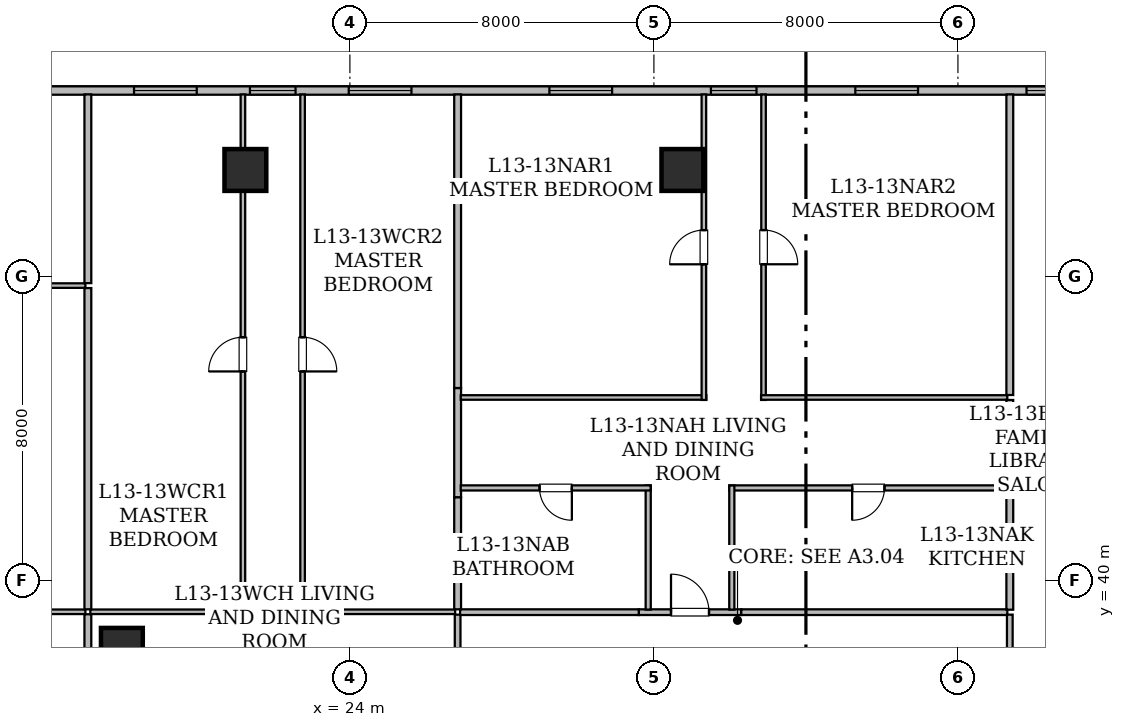
"""IFC4 building model, lengths in metres.
Left out: names, types, materials, properties, quantities, classifications, styles, units other than length and angle.
Written with IfcOpenShell. Run it as: python <this file> out.ifc"""

import sys

from ifc_helpers import new_model, si_unit, direction, frame, frame_2d, origin, origin_2d, place, context, subcontext, project, spatial, rectangle, hollow_rectangle, extrude, element, fill, save


model = new_model("IFC4")
c1 = context("Model", 3, precision=1e-05, world=origin(), true_north=direction((0.0, 1.0)))
c2 = subcontext(c1, "Body", "Model", "MODEL_VIEW")
j1 = project(units=[si_unit("LENGTHUNIT", "METRE"), si_unit("PLANEANGLEUNIT", "RADIAN")], contexts=[c1])
p1 = place(None, origin())
s1 = spatial("IfcSite", under=j1, at=p1, CompositionType="ELEMENT")
p2 = place(p1, origin())
s2 = spatial("IfcBuilding", under=s1, at=p2, CompositionType="ELEMENT")
p3 = place(p2, frame((0.0, 0.0, 55.2)))
s3 = spatial("IfcBuildingStorey", under=s2, at=p3, CompositionType="ELEMENT", Elevation=55.2)
for number, where, z_axis, x_axis in (
    (1, (21.25, 50.8, 0.0), (0.0, 0.0, 1.0), (1.0, 0.0, 0.0)),
    (2, (32.75, 50.8, 0.0), (0.0, 0.0, 1.0), (1.0, 0.0, 0.0)),
    (3, (18.0, 38.2, 0.0), (0.0, 0.0, 1.0), (1.0, 0.0, 0.0)),
):
    element("IfcColumn", number, at=place(p3, frame(where, z_axis=z_axis, x_axis=x_axis)), inside=s3, PredefinedType="COLUMN", context=c2, shape_type="SweptSolid", body=[
        extrude(hollow_rectangle(XDim=1.1, YDim=1.1, WallThickness=0.055, at=origin_2d()), origin(), (0.0, 0.0, 1.0), 3.65),
    ])
p4 = place(p3, frame((8.315, 52.89, 0.0), z_axis=(0.0, 0.0, 1.0), x_axis=(1.0, 0.0, 0.0)))
e4 = element("IfcWall", 4, at=p4, inside=s3, PredefinedType="STANDARD", context=c2, shape_type="SweptSolid", body=[
    extrude(rectangle(XDim=37.439, YDim=0.22, at=frame_2d((18.719, 0.0))), origin(), (0.0, 0.0, 1.0), 3.43),
])
p5 = place(p4, frame((5.093, 0.0, 0.85)))
e5 = element("IfcOpeningElement", 5, at=p5, cuts=e4, PredefinedType="OPENING", context=c2, shape_type="SweptSolid", body=[
    extrude(rectangle(XDim=1.65, YDim=1.55, at=frame_2d((0.825, 0.775))), frame((0.0, 0.12, 0.0), z_axis=(0.0, -1.0, 0.0), x_axis=(1.0, 0.0, 0.0)), (0.0, 0.0, 1.0), 0.24),
])
p6 = place(p4, frame((13.055, 0.0, 0.8)))
e6 = element("IfcOpeningElement", 6, at=p6, cuts=e4, PredefinedType="OPENING", context=c2, shape_type="SweptSolid", body=[
    extrude(rectangle(XDim=1.2, YDim=1.5, at=frame_2d((0.6, 0.75))), frame((0.0, 0.12, 0.0), z_axis=(0.0, -1.0, 0.0), x_axis=(1.0, 0.0, 0.0)), (0.0, 0.0, 1.0), 0.24),
])
p7 = place(p4, frame((10.005, 0.0, 0.85)))
e7 = element("IfcOpeningElement", 7, at=p7, cuts=e4, PredefinedType="OPENING", context=c2, shape_type="SweptSolid", body=[
    extrude(rectangle(XDim=1.65, YDim=1.55, at=frame_2d((0.825, 0.775))), frame((0.0, 0.12, 0.0), z_axis=(0.0, -1.0, 0.0), x_axis=(1.0, 0.0, 0.0)), (0.0, 0.0, 1.0), 0.24),
])
p8 = place(p4, frame((15.655, 0.0, 0.85)))
e8 = element("IfcOpeningElement", 8, at=p8, cuts=e4, PredefinedType="OPENING", context=c2, shape_type="SweptSolid", body=[
    extrude(rectangle(XDim=1.65, YDim=1.55, at=frame_2d((0.825, 0.775))), frame((0.0, 0.12, 0.0), z_axis=(0.0, -1.0, 0.0), x_axis=(1.0, 0.0, 0.0)), (0.0, 0.0, 1.0), 0.24),
])
p9 = place(p4, frame((25.185, 0.0, 0.8)))
e9 = element("IfcOpeningElement", 9, at=p9, cuts=e4, PredefinedType="OPENING", context=c2, shape_type="SweptSolid", body=[
    extrude(rectangle(XDim=1.2, YDim=1.5, at=frame_2d((0.6, 0.75))), frame((0.0, 0.12, 0.0), z_axis=(0.0, -1.0, 0.0), x_axis=(1.0, 0.0, 0.0)), (0.0, 0.0, 1.0), 0.24),
])
p10 = place(p4, frame((20.935, 0.0, 0.85)))
e10 = element("IfcOpeningElement", 10, at=p10, cuts=e4, PredefinedType="OPENING", context=c2, shape_type="SweptSolid", body=[
    extrude(rectangle(XDim=1.65, YDim=1.55, at=frame_2d((0.825, 0.775))), frame((0.0, 0.12, 0.0), z_axis=(0.0, -1.0, 0.0), x_axis=(1.0, 0.0, 0.0)), (0.0, 0.0, 1.0), 0.24),
])
p11 = place(p4, frame((28.985, 0.0, 0.85)))
e11 = element("IfcOpeningElement", 11, at=p11, cuts=e4, PredefinedType="OPENING", context=c2, shape_type="SweptSolid", body=[
    extrude(rectangle(XDim=1.65, YDim=1.55, at=frame_2d((0.825, 0.775))), frame((0.0, 0.12, 0.0), z_axis=(0.0, -1.0, 0.0), x_axis=(1.0, 0.0, 0.0)), (0.0, 0.0, 1.0), 0.24),
])
p12 = place(p4, frame((33.49, 0.0, 0.85)))
e12 = element("IfcOpeningElement", 12, at=p12, cuts=e4, PredefinedType="OPENING", context=c2, shape_type="SweptSolid", body=[
    extrude(rectangle(XDim=1.65, YDim=1.55, at=frame_2d((0.825, 0.775))), frame((0.0, 0.12, 0.0), z_axis=(0.0, -1.0, 0.0), x_axis=(1.0, 0.0, 0.0)), (0.0, 0.0, 1.0), 0.24),
])
p13 = place(p4, frame((35.942, 0.0, 0.85)))
e13 = element("IfcOpeningElement", 13, at=p13, cuts=e4, PredefinedType="OPENING", context=c2, shape_type="SweptSolid", body=[
    extrude(rectangle(XDim=1.35, YDim=1.5, at=frame_2d((0.675, 0.75))), frame((0.0, 0.12, 0.0), z_axis=(0.0, -1.0, 0.0), x_axis=(1.0, 0.0, 0.0)), (0.0, 0.0, 1.0), 0.24),
])
p14 = place(p3, frame((26.835, 36.546, 0.0), z_axis=(0.0, 0.0, 1.0), x_axis=(0.0, 1.0, 0.0)))
e14 = element("IfcWall", 14, at=p14, inside=s3, PredefinedType="STANDARD", context=c2, shape_type="SweptSolid", body=[
    extrude(rectangle(XDim=2.554, YDim=0.15, at=frame_2d((1.277, 0.0))), origin(), (0.0, 0.0, 1.0), 2.647),
])
p15 = place(p3, frame((31.601, 39.165, 0.0), z_axis=(0.0, 0.0, 1.0), x_axis=(1.0, 0.0, 0.0)))
e15 = element("IfcWall", 15, at=p15, inside=s3, PredefinedType="STANDARD", context=c2, shape_type="SweptSolid", body=[
    extrude(rectangle(XDim=2.698, YDim=0.15, at=frame_2d((1.349, 0.0))), origin(), (0.0, 0.0, 1.0), 3.43),
])
p16 = place(p15, frame((0.849, 0.0, 0.0)))
e16 = element("IfcOpeningElement", 16, at=p16, cuts=e15, PredefinedType="OPENING", context=c2, shape_type="SweptSolid", body=[
    extrude(rectangle(XDim=1.0, YDim=2.15, at=frame_2d((0.5, 1.075))), frame((0.0, 0.085, 0.0), z_axis=(0.0, -1.0, 0.0), x_axis=(1.0, 0.0, 0.0)), (0.0, 0.0, 1.0), 0.17),
])
p17 = place(p3, frame((26.9, 39.165, 0.0), z_axis=(0.0, 0.0, 1.0), x_axis=(1.0, 0.0, 0.0)))
e17 = element("IfcWall", 17, at=p17, inside=s3, PredefinedType="STANDARD", context=c2, shape_type="SweptSolid", body=[
    extrude(rectangle(XDim=4.701, YDim=0.15, at=frame_2d((2.351, 0.0))), origin(), (0.0, 0.0, 1.0), 2.647),
])
p18 = place(p3, frame((34.299, 39.165, 0.0), z_axis=(0.0, 0.0, 1.0), x_axis=(1.0, 0.0, 0.0)))
e18 = element("IfcWall", 18, at=p18, inside=s3, PredefinedType="STANDARD", context=c2, shape_type="SweptSolid", body=[
    extrude(rectangle(XDim=7.001, YDim=0.15, at=frame_2d((3.5, 0.0))), origin(), (0.0, 0.0, 1.0), 3.43),
])
p19 = place(p3, frame((41.365, 39.1, 0.0), z_axis=(0.0, 0.0, 1.0), x_axis=(0.0, -1.0, 0.0)))
e19 = element("IfcWall", 19, at=p19, inside=s3, PredefinedType="STANDARD", context=c2, shape_type="SweptSolid", body=[
    extrude(rectangle(XDim=2.843, YDim=0.15, at=frame_2d((1.421, 0.0))), origin(), (0.0, 0.0, 1.0), 2.647),
])
p20 = place(p3, frame((11.295, 39.175, 0.0), z_axis=(0.0, 0.0, 1.0), x_axis=(1.0, 0.0, 0.0)))
e20 = element("IfcWall", 20, at=p20, inside=s3, PredefinedType="PARTITIONING", context=c2, shape_type="SweptSolid", body=[
    extrude(rectangle(XDim=5.745, YDim=0.12, at=frame_2d((2.873, 0.0))), origin(), (0.0, 0.0, 1.0), 3.43),
])
p21 = place(p3, frame((17.105, 39.11, 0.0), z_axis=(0.0, 0.0, 1.0), x_axis=(0.0, -1.0, 0.0)))
e21 = element("IfcWall", 21, at=p21, inside=s3, PredefinedType="STANDARD", context=c2, shape_type="SweptSolid", body=[
    extrude(rectangle(XDim=2.25, YDim=0.18, at=frame_2d((1.125, 0.0))), origin(), (0.0, 0.0, 1.0), 2.647),
])
p22 = place(p3, frame((11.414, 47.758, 0.0), z_axis=(0.0, 0.0, 1.0), x_axis=(1.0, 0.0, 0.0)))
e22 = element("IfcWall", 22, at=p22, inside=s3, PredefinedType="PARTITIONING", context=c2, shape_type="SweptSolid", body=[
    extrude(rectangle(XDim=5.626, YDim=0.12, at=frame_2d((2.813, 0.0))), origin(), (0.0, 0.0, 1.0), 2.647),
])
p23 = place(p3, frame((17.105, 47.693, 0.0), z_axis=(0.0, 0.0, 1.0), x_axis=(0.0, -1.0, 0.0)))
e23 = element("IfcWall", 23, at=p23, inside=s3, PredefinedType="STANDARD", context=c2, shape_type="SweptSolid", body=[
    extrude(rectangle(XDim=8.453, YDim=0.18, at=frame_2d((4.227, 0.0))), origin(), (0.0, 0.0, 1.0), 2.647),
])
p24 = place(p3, frame((17.105, 52.788, 0.0), z_axis=(0.0, 0.0, 1.0), x_axis=(0.0, -1.0, 0.0)))
e24 = element("IfcWall", 24, at=p24, inside=s3, PredefinedType="STANDARD", context=c2, shape_type="SweptSolid", body=[
    extrude(rectangle(XDim=4.965, YDim=0.18, at=frame_2d((2.482, 0.0))), origin(), (0.0, 0.0, 1.0), 2.803),
])
p25 = place(p3, frame((17.17, 39.175, 0.0), z_axis=(0.0, 0.0, 1.0), x_axis=(1.0, 0.0, 0.0)))
e25 = element("IfcWall", 25, at=p25, inside=s3, PredefinedType="PARTITIONING", context=c2, shape_type="SweptSolid", body=[
    extrude(rectangle(XDim=4.08, YDim=0.12, at=frame_2d((2.04, 0.0))), origin(), (0.0, 0.0, 1.0), 2.647),
])
p26 = place(p3, frame((21.185, 39.11, 0.0), z_axis=(0.0, 0.0, 1.0), x_axis=(0.0, 1.0, 0.0)))
e26 = element("IfcWall", 26, at=p26, inside=s3, PredefinedType="PARTITIONING", context=c2, shape_type="SweptSolid", body=[
    extrude(rectangle(XDim=13.678, YDim=0.12, at=frame_2d((6.839, 0.0))), origin(), (0.0, 0.0, 1.0), 2.647),
])
p27 = place(p26, frame((6.389, 0.0, 0.0)))
e27 = element("IfcOpeningElement", 27, at=p27, cuts=e26, PredefinedType="OPENING", context=c2, shape_type="SweptSolid", body=[
    extrude(rectangle(XDim=0.9, YDim=2.1, at=frame_2d((0.45, 1.05))), frame((0.0, 0.07, 0.0), z_axis=(0.0, -1.0, 0.0), x_axis=(1.0, 0.0, 0.0)), (0.0, 0.0, 1.0), 0.14),
])
p28 = place(p3, frame((22.755, 52.788, 0.0), z_axis=(0.0, 0.0, 1.0), x_axis=(0.0, -1.0, 0.0)))
e28 = element("IfcWall", 28, at=p28, inside=s3, PredefinedType="PARTITIONING", context=c2, shape_type="SweptSolid", body=[
    extrude(rectangle(XDim=13.678, YDim=0.12, at=frame_2d((6.839, 0.0))), origin(), (0.0, 0.0, 1.0), 2.803),
])
p29 = place(p28, frame((6.389, 0.0, 0.0)))
e29 = element("IfcOpeningElement", 29, at=p29, cuts=e28, PredefinedType="OPENING", context=c2, shape_type="SweptSolid", body=[
    extrude(rectangle(XDim=0.9, YDim=2.1, at=frame_2d((0.45, 1.05))), frame((0.0, 0.07, 0.0), z_axis=(0.0, -1.0, 0.0), x_axis=(1.0, 0.0, 0.0)), (0.0, 0.0, 1.0), 0.14),
])
p30 = place(p3, frame((22.69, 39.175, 0.0), z_axis=(0.0, 0.0, 1.0), x_axis=(1.0, 0.0, 0.0)))
e30 = element("IfcWall", 30, at=p30, inside=s3, PredefinedType="PARTITIONING", context=c2, shape_type="SweptSolid", body=[
    extrude(rectangle(XDim=4.08, YDim=0.12, at=frame_2d((2.04, 0.0))), origin(), (0.0, 0.0, 1.0), 3.43),
])
p31 = place(p3, frame((26.835, 45.063, 0.0), z_axis=(0.0, 0.0, 1.0), x_axis=(0.0, -1.0, 0.0)))
e31 = element("IfcWall", 31, at=p31, inside=s3, PredefinedType="STANDARD", context=c2, shape_type="SweptSolid", body=[
    extrude(rectangle(XDim=2.878, YDim=0.18, at=frame_2d((1.439, 0.0))), origin(), (0.0, 0.0, 1.0), 2.957),
])
p32 = place(p3, frame((26.835, 42.185, 0.0), z_axis=(0.0, 0.0, 1.0), x_axis=(0.0, -1.0, 0.0)))
e32 = element("IfcWall", 32, at=p32, inside=s3, PredefinedType="STANDARD", context=c2, shape_type="SweptSolid", body=[
    extrude(rectangle(XDim=2.945, YDim=0.18, at=frame_2d((1.473, 0.0))), origin(), (0.0, 0.0, 1.0), 3.43),
])
p33 = place(p3, frame((26.835, 52.788, 0.0), z_axis=(0.0, 0.0, 1.0), x_axis=(0.0, -1.0, 0.0)))
e33 = element("IfcWall", 33, at=p33, inside=s3, PredefinedType="STANDARD", context=c2, shape_type="SweptSolid", body=[
    extrude(rectangle(XDim=7.725, YDim=0.18, at=frame_2d((3.863, 0.0))), origin(), (0.0, 0.0, 1.0), 2.803),
])
p34 = place(p3, frame((31.85, 39.232, 0.0), z_axis=(0.0, 0.0, 1.0), x_axis=(0.0, 1.0, 0.0)))
e34 = element("IfcWall", 34, at=p34, inside=s3, PredefinedType="PARTITIONING", context=c2, shape_type="SweptSolid", body=[
    extrude(rectangle(XDim=3.267, YDim=0.135, at=frame_2d((1.634, 0.0))), origin(), (0.0, 0.0, 1.0), 3.43),
])
p35 = place(p3, frame((31.915, 42.434, 0.0), z_axis=(0.0, 0.0, 1.0), x_axis=(-1.0, 0.0, 0.0)))
e35 = element("IfcWall", 35, at=p35, inside=s3, PredefinedType="PARTITIONING", context=c2, shape_type="SweptSolid", body=[
    extrude(rectangle(XDim=4.998, YDim=0.135, at=frame_2d((2.499, 0.0))), origin(), (0.0, 0.0, 1.0), 2.647),
])
p36 = place(p35, frame((2.074, 0.0, 0.0)))
e36 = element("IfcOpeningElement", 36, at=p36, cuts=e35, PredefinedType="OPENING", context=c2, shape_type="SweptSolid", body=[
    extrude(rectangle(XDim=0.85, YDim=2.1, at=frame_2d((0.425, 1.05))), frame((0.0, 0.077, 0.0), z_axis=(0.0, -1.0, 0.0), x_axis=(1.0, 0.0, 0.0)), (0.0, 0.0, 1.0), 0.155),
])
p37 = place(p3, frame((41.3, 42.434, 0.0), z_axis=(0.0, 0.0, 1.0), x_axis=(-1.0, 0.0, 0.0)))
e37 = element("IfcWall", 37, at=p37, inside=s3, PredefinedType="PARTITIONING", context=c2, shape_type="SweptSolid", body=[
    extrude(rectangle(XDim=7.315, YDim=0.135, at=frame_2d((3.657, 0.0))), origin(), (0.0, 0.0, 1.0), 2.957),
])
p38 = place(p37, frame((3.233, 0.0, 0.0)))
e38 = element("IfcOpeningElement", 38, at=p38, cuts=e37, PredefinedType="OPENING", context=c2, shape_type="SweptSolid", body=[
    extrude(rectangle(XDim=0.85, YDim=2.1, at=frame_2d((0.425, 1.05))), frame((0.0, 0.077, 0.0), z_axis=(0.0, -1.0, 0.0), x_axis=(1.0, 0.0, 0.0)), (0.0, 0.0, 1.0), 0.155),
])
p39 = place(p3, frame((34.05, 42.499, 0.0), z_axis=(0.0, 0.0, 1.0), x_axis=(0.0, -1.0, 0.0)))
e39 = element("IfcWall", 39, at=p39, inside=s3, PredefinedType="PARTITIONING", context=c2, shape_type="SweptSolid", body=[
    extrude(rectangle(XDim=3.267, YDim=0.135, at=frame_2d((1.634, 0.0))), origin(), (0.0, 0.0, 1.0), 3.43),
])
p40 = place(p3, frame((26.917, 44.814, 0.0), z_axis=(0.0, 0.0, 1.0), x_axis=(1.0, 0.0, 0.0)))
e40 = element("IfcWall", 40, at=p40, inside=s3, PredefinedType="PARTITIONING", context=c2, shape_type="SweptSolid", body=[
    extrude(rectangle(XDim=6.463, YDim=0.12, at=frame_2d((3.231, 0.0))), origin(), (0.0, 0.0, 1.0), 2.647),
])
p41 = place(p3, frame((33.315, 44.749, 0.0), z_axis=(0.0, 0.0, 1.0), x_axis=(0.0, 1.0, 0.0)))
e41 = element("IfcWall", 41, at=p41, inside=s3, PredefinedType="PARTITIONING", context=c2, shape_type="SweptSolid", body=[
    extrude(rectangle(XDim=8.039, YDim=0.12, at=frame_2d((4.02, 0.0))), origin(), (0.0, 0.0, 1.0), 2.803),
])
p42 = place(p41, frame((3.569, 0.0, 0.0)))
e42 = element("IfcOpeningElement", 42, at=p42, cuts=e41, PredefinedType="OPENING", context=c2, shape_type="SweptSolid", body=[
    extrude(rectangle(XDim=0.9, YDim=2.1, at=frame_2d((0.45, 1.05))), frame((0.0, 0.07, 0.0), z_axis=(0.0, -1.0, 0.0), x_axis=(1.0, 0.0, 0.0)), (0.0, 0.0, 1.0), 0.14),
])
p43 = place(p3, frame((34.885, 52.788, 0.0), z_axis=(0.0, 0.0, 1.0), x_axis=(0.0, -1.0, 0.0)))
e43 = element("IfcWall", 43, at=p43, inside=s3, PredefinedType="PARTITIONING", context=c2, shape_type="SweptSolid", body=[
    extrude(rectangle(XDim=8.039, YDim=0.12, at=frame_2d((4.02, 0.0))), origin(), (0.0, 0.0, 1.0), 2.803),
])
p44 = place(p43, frame((3.569, 0.0, 0.0)))
e44 = element("IfcOpeningElement", 44, at=p44, cuts=e43, PredefinedType="OPENING", context=c2, shape_type="SweptSolid", body=[
    extrude(rectangle(XDim=0.9, YDim=2.1, at=frame_2d((0.45, 1.05))), frame((0.0, 0.07, 0.0), z_axis=(0.0, -1.0, 0.0), x_axis=(1.0, 0.0, 0.0)), (0.0, 0.0, 1.0), 0.14),
])
p45 = place(p3, frame((34.82, 44.814, 0.0), z_axis=(0.0, 0.0, 1.0), x_axis=(1.0, 0.0, 0.0)))
e45 = element("IfcWall", 45, at=p45, inside=s3, PredefinedType="PARTITIONING", context=c2, shape_type="SweptSolid", body=[
    extrude(rectangle(XDim=6.48, YDim=0.12, at=frame_2d((3.24, 0.0))), origin(), (0.0, 0.0, 1.0), 3.43),
])
p46 = place(p3, frame((41.365, 44.749, 0.0), z_axis=(0.0, 0.0, 1.0), x_axis=(0.0, -1.0, 0.0)))
e46 = element("IfcWall", 46, at=p46, inside=s3, PredefinedType="STANDARD", context=c2, shape_type="SweptSolid", body=[
    extrude(rectangle(XDim=2.25, YDim=0.18, at=frame_2d((1.125, 0.0))), origin(), (0.0, 0.0, 1.0), 2.957),
])
p47 = place(p3, frame((41.365, 42.369, 0.0), z_axis=(0.0, 0.0, 1.0), x_axis=(0.0, -1.0, 0.0)))
e47 = element("IfcWall", 47, at=p47, inside=s3, PredefinedType="STANDARD", context=c2, shape_type="SweptSolid", body=[
    extrude(rectangle(XDim=3.139, YDim=0.18, at=frame_2d((1.569, 0.0))), origin(), (0.0, 0.0, 1.0), 3.43),
])
p48 = place(p3, frame((41.365, 52.788, 0.0), z_axis=(0.0, 0.0, 1.0), x_axis=(0.0, -1.0, 0.0)))
e48 = element("IfcWall", 48, at=p48, inside=s3, PredefinedType="STANDARD", context=c2, shape_type="SweptSolid", body=[
    extrude(rectangle(XDim=7.909, YDim=0.18, at=frame_2d((3.955, 0.0))), origin(), (0.0, 0.0, 1.0), 2.803),
])
p49 = place(p6, origin())
e49 = element("IfcWindow", 49, at=p49, inside=s3, PartitioningType="SINGLE_PANEL", PredefinedType="WINDOW", context=c2, shape_type="SweptSolid", body=[
    extrude(rectangle(XDim=1.2, YDim=1.5, at=frame_2d((0.6, 0.75))), frame((0.0, 0.03, 0.0), z_axis=(0.0, -1.0, 0.0), x_axis=(1.0, 0.0, 0.0)), (0.0, 0.0, 1.0), 0.06),
])
fill(e6, e49)
p50 = place(p7, origin())
e50 = element("IfcWindow", 50, at=p50, inside=s3, PartitioningType="SINGLE_PANEL", PredefinedType="WINDOW", context=c2, shape_type="SweptSolid", body=[
    extrude(rectangle(XDim=1.65, YDim=1.55, at=frame_2d((0.825, 0.775))), frame((0.0, 0.03, 0.0), z_axis=(0.0, -1.0, 0.0), x_axis=(1.0, 0.0, 0.0)), (0.0, 0.0, 1.0), 0.06),
])
fill(e7, e50)
p51 = place(p8, origin())
e51 = element("IfcWindow", 51, at=p51, inside=s3, PartitioningType="SINGLE_PANEL", PredefinedType="WINDOW", context=c2, shape_type="SweptSolid", body=[
    extrude(rectangle(XDim=1.65, YDim=1.55, at=frame_2d((0.825, 0.775))), frame((0.0, 0.03, 0.0), z_axis=(0.0, -1.0, 0.0), x_axis=(1.0, 0.0, 0.0)), (0.0, 0.0, 1.0), 0.06),
])
fill(e8, e51)
p52 = place(p9, origin())
e52 = element("IfcWindow", 52, at=p52, inside=s3, PartitioningType="SINGLE_PANEL", PredefinedType="WINDOW", context=c2, shape_type="SweptSolid", body=[
    extrude(rectangle(XDim=1.2, YDim=1.5, at=frame_2d((0.6, 0.75))), frame((0.0, 0.03, 0.0), z_axis=(0.0, -1.0, 0.0), x_axis=(1.0, 0.0, 0.0)), (0.0, 0.0, 1.0), 0.06),
])
fill(e9, e52)
p53 = place(p10, origin())
e53 = element("IfcWindow", 53, at=p53, inside=s3, PartitioningType="SINGLE_PANEL", PredefinedType="WINDOW", context=c2, shape_type="SweptSolid", body=[
    extrude(rectangle(XDim=1.65, YDim=1.55, at=frame_2d((0.825, 0.775))), frame((0.0, 0.03, 0.0), z_axis=(0.0, -1.0, 0.0), x_axis=(1.0, 0.0, 0.0)), (0.0, 0.0, 1.0), 0.06),
])
fill(e10, e53)
p54 = place(p11, origin())
e54 = element("IfcWindow", 54, at=p54, inside=s3, PartitioningType="SINGLE_PANEL", PredefinedType="WINDOW", context=c2, shape_type="SweptSolid", body=[
    extrude(rectangle(XDim=1.65, YDim=1.55, at=frame_2d((0.825, 0.775))), frame((0.0, 0.03, 0.0), z_axis=(0.0, -1.0, 0.0), x_axis=(1.0, 0.0, 0.0)), (0.0, 0.0, 1.0), 0.06),
])
fill(e11, e54)
p55 = place(p12, origin())
e55 = element("IfcWindow", 55, at=p55, inside=s3, PartitioningType="SINGLE_PANEL", PredefinedType="WINDOW", context=c2, shape_type="SweptSolid", body=[
    extrude(rectangle(XDim=1.65, YDim=1.55, at=frame_2d((0.825, 0.775))), frame((0.0, 0.03, 0.0), z_axis=(0.0, -1.0, 0.0), x_axis=(1.0, 0.0, 0.0)), (0.0, 0.0, 1.0), 0.06),
])
fill(e12, e55)
p56 = place(p16, origin())
e56 = element("IfcDoor", 56, at=p56, inside=s3, OperationType="SINGLE_SWING_LEFT", PredefinedType="DOOR", context=c2, shape_type="SweptSolid", body=[
    extrude(rectangle(XDim=1.0, YDim=2.15, at=frame_2d((0.5, 1.075))), frame((0.0, 0.025, 0.0), z_axis=(0.0, -1.0, 0.0), x_axis=(1.0, 0.0, 0.0)), (0.0, 0.0, 1.0), 0.05),
])
fill(e16, e56)
p57 = place(p27, origin())
e57 = element("IfcDoor", 57, at=p57, inside=s3, OperationType="SINGLE_SWING_LEFT", PredefinedType="DOOR", context=c2, shape_type="SweptSolid", body=[
    extrude(rectangle(XDim=0.9, YDim=2.1, at=frame_2d((0.45, 1.05))), frame((0.0, 0.025, 0.0), z_axis=(0.0, -1.0, 0.0), x_axis=(1.0, 0.0, 0.0)), (0.0, 0.0, 1.0), 0.05),
])
fill(e27, e57)
p58 = place(p29, origin())
e58 = element("IfcDoor", 58, at=p58, inside=s3, OperationType="SINGLE_SWING_RIGHT", PredefinedType="DOOR", context=c2, shape_type="SweptSolid", body=[
    extrude(rectangle(XDim=0.9, YDim=2.1, at=frame_2d((0.45, 1.05))), frame((0.0, 0.025, 0.0), z_axis=(0.0, -1.0, 0.0), x_axis=(1.0, 0.0, 0.0)), (0.0, 0.0, 1.0), 0.05),
])
fill(e29, e58)
p59 = place(p36, origin())
e59 = element("IfcDoor", 59, at=p59, inside=s3, OperationType="SINGLE_SWING_LEFT", PredefinedType="DOOR", context=c2, shape_type="SweptSolid", body=[
    extrude(rectangle(XDim=0.85, YDim=2.1, at=frame_2d((0.425, 1.05))), frame((0.0, 0.025, 0.0), z_axis=(0.0, -1.0, 0.0), x_axis=(1.0, 0.0, 0.0)), (0.0, 0.0, 1.0), 0.05),
])
fill(e36, e59)
p60 = place(p38, origin())
e60 = element("IfcDoor", 60, at=p60, inside=s3, OperationType="SINGLE_SWING_RIGHT", PredefinedType="DOOR", context=c2, shape_type="SweptSolid", body=[
    extrude(rectangle(XDim=0.85, YDim=2.1, at=frame_2d((0.425, 1.05))), frame((0.0, 0.025, 0.0), z_axis=(0.0, -1.0, 0.0), x_axis=(1.0, 0.0, 0.0)), (0.0, 0.0, 1.0), 0.05),
])
fill(e38, e60)
p61 = place(p42, origin())
e61 = element("IfcDoor", 61, at=p61, inside=s3, OperationType="SINGLE_SWING_LEFT", PredefinedType="DOOR", context=c2, shape_type="SweptSolid", body=[
    extrude(rectangle(XDim=0.9, YDim=2.1, at=frame_2d((0.45, 1.05))), frame((0.0, 0.025, 0.0), z_axis=(0.0, -1.0, 0.0), x_axis=(1.0, 0.0, 0.0)), (0.0, 0.0, 1.0), 0.05),
])
fill(e42, e61)
p62 = place(p44, origin())
e62 = element("IfcDoor", 62, at=p62, inside=s3, OperationType="SINGLE_SWING_RIGHT", PredefinedType="DOOR", context=c2, shape_type="SweptSolid", body=[
    extrude(rectangle(XDim=0.9, YDim=2.1, at=frame_2d((0.45, 1.05))), frame((0.0, 0.025, 0.0), z_axis=(0.0, -1.0, 0.0), x_axis=(1.0, 0.0, 0.0)), (0.0, 0.0, 1.0), 0.05),
])
fill(e44, e62)
save(model, sys.argv[1])
